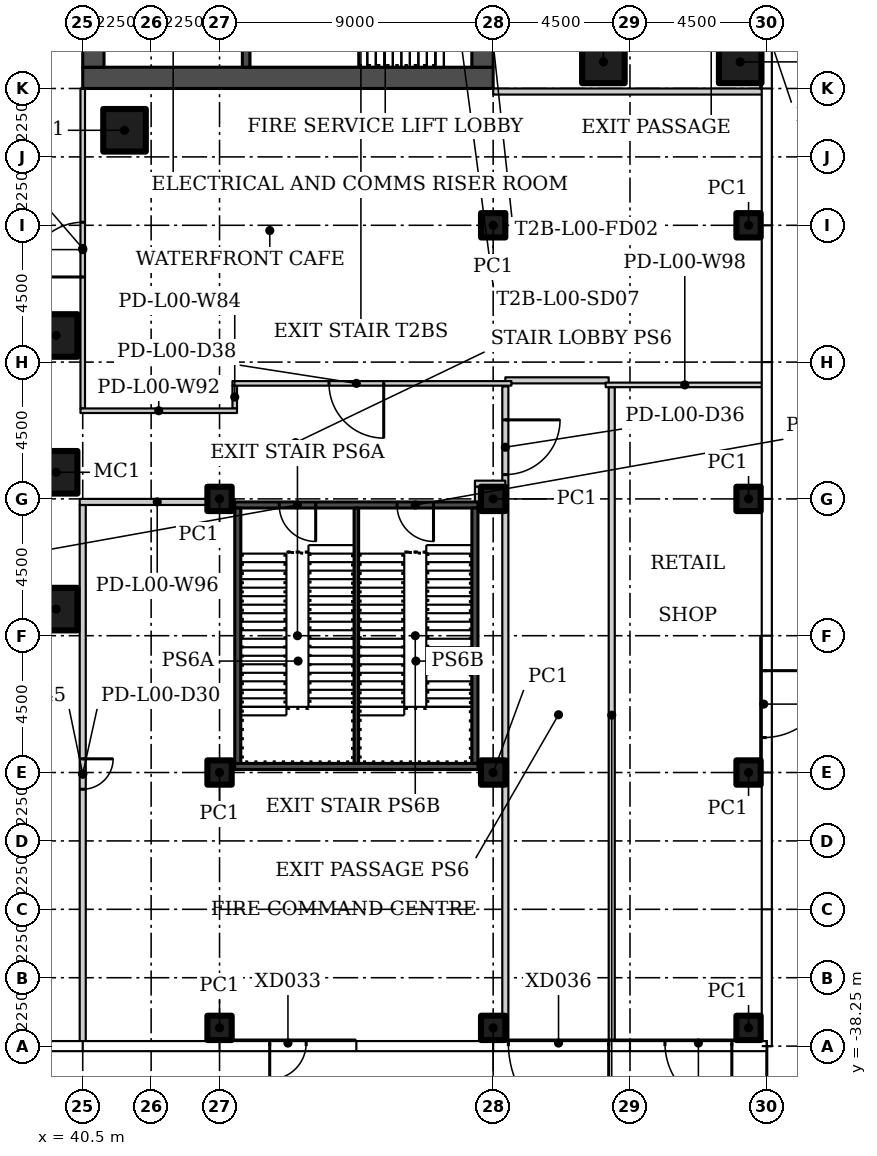
"""IFC4 building model, lengths in metres.
Left out: names, types, materials, properties, quantities, classifications, styles, units other than length and angle.
Written with IfcOpenShell. Run it as: python <this file> out.ifc"""

import sys

from ifc_helpers import new_model, si_unit, direction, frame, frame_2d, origin, origin_2d, place, context, subcontext, project, spatial, rectangle, hollow_rectangle, extrude, element, fill, save


model = new_model("IFC4")
c1 = context("Model", 3, precision=1e-05, world=origin(), true_north=direction((0.0, 1.0)))
c2 = subcontext(c1, "Body", "Model", "MODEL_VIEW")
j1 = project(units=[si_unit("LENGTHUNIT", "METRE"), si_unit("PLANEANGLEUNIT", "RADIAN")], contexts=[c1])
p1 = place(None, origin())
s1 = spatial("IfcSite", under=j1, at=p1, CompositionType="ELEMENT")
p2 = place(p1, origin())
s2 = spatial("IfcBuilding", under=s1, at=p2, CompositionType="ELEMENT")
p3 = place(p2, origin())
s3 = spatial("IfcBuildingStorey", under=s2, at=p3, CompositionType="ELEMENT", Elevation=0.0)
for number, where in (
    (1, (41.875, -8.125, 0.0)),
    (2, (39.625, -14.875, 0.0)),
    (3, (39.625, -19.375, 0.0)),
    (4, (39.625, -23.875, 0.0)),
    (5, (57.625, -5.875, 0.0)),
    (6, (62.125, -5.875, 0.0)),
):
    element("IfcColumn", number, at=place(p3, frame(where)), inside=s3, PredefinedType="COLUMN", context=c2, shape_type="SweptSolid", body=[
        extrude(hollow_rectangle(XDim=1.4, YDim=1.4, WallThickness=0.06, at=origin_2d()), origin(), (0.0, 0.0, 1.0), 6.1),
    ])
for number, where in (
    (7, (45.0, -37.65, 0.0)),
    (8, (45.0, -29.25, 0.0)),
    (9, (45.0, -20.25, 0.0)),
    (10, (54.0, -37.65, 0.0)),
    (11, (54.0, -29.25, 0.0)),
    (12, (54.0, -20.25, 0.0)),
    (13, (54.0, -11.25, 0.0)),
    (14, (62.4, -37.65, 0.0)),
    (15, (62.4, -29.25, 0.0)),
    (16, (62.4, -20.25, 0.0)),
    (17, (62.4, -11.25, 0.0)),
):
    element("IfcColumn", number, at=place(p3, frame(where)), inside=s3, PredefinedType="COLUMN", context=c2, shape_type="SweptSolid", body=[
        extrude(hollow_rectangle(XDim=0.8, YDim=0.8, WallThickness=0.03, at=origin_2d()), origin(), (0.0, 0.0, 1.0), 6.1),
    ])
p4 = place(p3, frame((54.0, -6.85, 0.0)))
e18 = element("IfcWall", 18, at=p4, inside=s3, PredefinedType="PARTITIONING", context=c2, shape_type="SweptSolid", body=[
    extrude(rectangle(XDim=8.905, YDim=0.2, at=frame_2d((4.453, 0.0))), origin(), (0.0, 0.0, 1.0), 6.1),
])
p5 = place(p3, frame((54.4, -16.55, 0.0), z_axis=(0.0, 0.0, 1.0), x_axis=(0.0, -1.0, 0.0)))
e19 = element("IfcWall", 19, at=p5, inside=s3, PredefinedType="PARTITIONING", context=c2, shape_type="SweptSolid", body=[
    extrude(rectangle(XDim=21.605, YDim=0.2, at=frame_2d((10.802, 0.0))), origin(), (0.0, 0.0, 1.0), 6.1),
])
p6 = place(p5, frame((1.1, 0.0, 0.0)))
e20 = element("IfcOpeningElement", 20, at=p6, cuts=e19, PredefinedType="OPENING", context=c2, shape_type="SweptSolid", body=[
    extrude(rectangle(XDim=1.8, YDim=2.1, at=frame_2d((0.9, 1.05))), frame((0.0, 0.11, 0.0), z_axis=(0.0, -1.0, 0.0), x_axis=(1.0, 0.0, 0.0)), (0.0, 0.0, 1.0), 0.22),
])
p7 = place(p3, frame((57.9, -38.155, 0.0), z_axis=(0.0, 0.0, 1.0), x_axis=(0.0, 1.0, 0.0)))
e21 = element("IfcWall", 21, at=p7, inside=s3, PredefinedType="PARTITIONING", context=c2, shape_type="SweptSolid", body=[
    extrude(rectangle(XDim=21.58, YDim=0.2, at=frame_2d((10.79, 0.0))), origin(), (0.0, 0.0, 1.0), 6.1),
])
p8 = place(p3, frame((57.8, -16.35, 0.0), z_axis=(0.0, 0.0, 1.0), x_axis=(-1.0, 0.0, 0.0)))
e22 = element("IfcWall", 22, at=p8, inside=s3, PredefinedType="PARTITIONING", context=c2, shape_type="SweptSolid", body=[
    extrude(rectangle(XDim=3.4, YDim=0.2, at=frame_2d((1.7, 0.0))), origin(), (0.0, 0.0, 1.0), 6.1),
])
p9 = place(p3, frame((40.5, -20.45, 0.0), z_axis=(0.0, 0.0, 1.0), x_axis=(0.0, -1.0, 0.0)))
e23 = element("IfcWall", 23, at=p9, inside=s3, PredefinedType="PARTITIONING", context=c2, shape_type="SweptSolid", body=[
    extrude(rectangle(XDim=17.705, YDim=0.2, at=frame_2d((8.853, 0.0))), origin(), (0.0, 0.0, 1.0), 6.1),
])
p10 = place(p9, frame((8.35, 0.0, 0.0)))
e24 = element("IfcOpeningElement", 24, at=p10, cuts=e23, PredefinedType="OPENING", context=c2, shape_type="SweptSolid", body=[
    extrude(rectangle(XDim=1.0, YDim=2.1, at=frame_2d((0.5, 1.05))), frame((0.0, 0.11, 0.0), z_axis=(0.0, -1.0, 0.0), x_axis=(1.0, 0.0, 0.0)), (0.0, 0.0, 1.0), 0.22),
])
p11 = place(p3, frame((40.5, -17.275, 0.0), z_axis=(0.0, 0.0, 1.0), x_axis=(0.0, 1.0, 0.0)))
e25 = element("IfcWall", 25, at=p11, inside=s3, PredefinedType="PARTITIONING", context=c2, shape_type="SweptSolid", body=[
    extrude(rectangle(XDim=10.525, YDim=0.15, at=frame_2d((5.262, 0.0))), origin(), (0.0, 0.0, 1.0), 6.1),
])
p12 = place(p11, frame((4.325, 0.0, 0.0)))
e26 = element("IfcOpeningElement", 26, at=p12, cuts=e25, PredefinedType="OPENING", context=c2, shape_type="SweptSolid", body=[
    extrude(rectangle(XDim=1.8, YDim=2.4, at=frame_2d((0.9, 1.2))), frame((0.0, 0.085, 0.0), z_axis=(0.0, -1.0, 0.0), x_axis=(1.0, 0.0, 0.0)), (0.0, 0.0, 1.0), 0.17),
])
p13 = place(p3, frame((45.5, -16.525, 0.0), z_axis=(0.0, 0.0, 1.0), x_axis=(0.0, -1.0, 0.0)))
e27 = element("IfcWall", 27, at=p13, inside=s3, PredefinedType="PARTITIONING", context=c2, shape_type="SweptSolid", body=[
    extrude(rectangle(XDim=0.75, YDim=0.15, at=frame_2d((0.375, 0.0))), origin(), (0.0, 0.0, 1.0), 6.1),
])
p14 = place(p3, frame((54.6, -16.45, 0.0), z_axis=(0.0, 0.0, 1.0), x_axis=(-1.0, 0.0, 0.0)))
e28 = element("IfcWall", 28, at=p14, inside=s3, PredefinedType="PARTITIONING", context=c2, shape_type="SweptSolid", body=[
    extrude(rectangle(XDim=9.175, YDim=0.15, at=frame_2d((4.587, 0.0))), origin(), (0.0, 0.0, 1.0), 6.1),
])
p15 = place(p14, frame((4.2, 0.0, 0.0)))
e29 = element("IfcOpeningElement", 29, at=p15, cuts=e28, PredefinedType="OPENING", context=c2, shape_type="SweptSolid", body=[
    extrude(rectangle(XDim=1.8, YDim=2.4, at=frame_2d((0.9, 1.2))), frame((0.0, 0.085, 0.0), z_axis=(0.0, -1.0, 0.0), x_axis=(1.0, 0.0, 0.0)), (0.0, 0.0, 1.0), 0.17),
])
p16 = place(p3, frame((45.575, -17.35, 0.0), z_axis=(0.0, 0.0, 1.0), x_axis=(-1.0, 0.0, 0.0)))
e30 = element("IfcWall", 30, at=p16, inside=s3, PredefinedType="PARTITIONING", context=c2, shape_type="SweptSolid", body=[
    extrude(rectangle(XDim=5.15, YDim=0.15, at=frame_2d((2.575, 0.0))), origin(), (0.0, 0.0, 1.0), 6.1),
])
p17 = place(p3, frame((54.4, -19.75, 0.0), z_axis=(0.0, 0.0, 1.0), x_axis=(-1.0, 0.0, 0.0)))
e31 = element("IfcWall", 31, at=p17, inside=s3, PredefinedType="PARTITIONING", context=c2, shape_type="SweptSolid", body=[
    extrude(rectangle(XDim=1.0, YDim=0.2, at=frame_2d((0.5, 0.0))), origin(), (0.0, 0.0, 1.0), 6.1),
])
p18 = place(p3, frame((53.5, -19.85, 0.0), z_axis=(0.0, 0.0, 1.0), x_axis=(0.0, -1.0, 0.0)))
e32 = element("IfcWall", 32, at=p18, inside=s3, PredefinedType="PARTITIONING", context=c2, shape_type="SweptSolid", body=[
    extrude(rectangle(XDim=0.5, YDim=0.2, at=frame_2d((0.25, 0.0))), origin(), (0.0, 0.0, 1.0), 6.1),
])
p19 = place(p3, frame((45.5, -20.35, 0.0), z_axis=(0.0, 0.0, 1.0), x_axis=(-1.0, 0.0, 0.0)))
e33 = element("IfcWall", 33, at=p19, inside=s3, PredefinedType="PARTITIONING", context=c2, shape_type="SweptSolid", body=[
    extrude(rectangle(XDim=5.1, YDim=0.2, at=frame_2d((2.55, 0.0))), origin(), (0.0, 0.0, 1.0), 6.1),
])
p20 = place(p3, frame((62.905, -16.5, 0.0), z_axis=(0.0, 0.0, 1.0), x_axis=(-1.0, 0.0, 0.0)))
e34 = element("IfcWall", 34, at=p20, inside=s3, PredefinedType="PARTITIONING", context=c2, shape_type="SweptSolid", body=[
    extrude(rectangle(XDim=5.205, YDim=0.15, at=frame_2d((2.603, 0.0))), origin(), (0.0, 0.0, 1.0), 6.1),
])
p21 = place(p3, frame((62.9, -2.243, 0.0), z_axis=(0.0, 0.0, 1.0), x_axis=(0.0, -1.0, 0.0)))
e35 = element("IfcWall", 35, at=p21, inside=s3, PredefinedType="SOLIDWALL", context=c2, shape_type="SweptSolid", body=[
    extrude(rectangle(XDim=4.514, YDim=0.2, at=frame_2d((2.257, 0.0))), origin(), (0.0, 0.0, 1.0), 3.0),
])
p22 = place(p21, frame((1.657, 0.0, 0.0)))
e36 = element("IfcOpeningElement", 36, at=p22, cuts=e35, PredefinedType="OPENING", context=c2, shape_type="SweptSolid", body=[
    extrude(rectangle(XDim=1.2, YDim=2.4, at=frame_2d((0.6, 1.2))), frame((0.0, 0.11, 0.0), z_axis=(0.0, -1.0, 0.0), x_axis=(1.0, 0.0, 0.0)), (0.0, 0.0, 1.0), 0.22),
])
p23 = place(p3, frame((62.9, -24.79, 0.0), z_axis=(0.0, 0.0, 1.0), x_axis=(0.0, -1.0, 0.0)))
e37 = element("IfcWall", 37, at=p23, inside=s3, PredefinedType="SOLIDWALL", context=c2, shape_type="SweptSolid", body=[
    extrude(rectangle(XDim=4.42, YDim=0.2, at=frame_2d((2.21, 0.0))), origin(), (0.0, 0.0, 1.0), 3.0),
])
p24 = place(p23, frame((1.11, 0.0, 0.0)))
e38 = element("IfcOpeningElement", 38, at=p24, cuts=e37, PredefinedType="OPENING", context=c2, shape_type="SweptSolid", body=[
    extrude(rectangle(XDim=2.2, YDim=2.4, at=frame_2d((1.1, 1.2))), frame((0.0, 0.11, 0.0), z_axis=(0.0, -1.0, 0.0), x_axis=(1.0, 0.0, 0.0)), (0.0, 0.0, 1.0), 0.22),
])
p25 = place(p3, frame((49.46, -38.15, 0.0), z_axis=(0.0, 0.0, 1.0), x_axis=(-1.0, 0.0, 0.0)))
e39 = element("IfcWall", 39, at=p25, inside=s3, PredefinedType="SOLIDWALL", context=c2, shape_type="SweptSolid", body=[
    extrude(rectangle(XDim=4.42, YDim=0.2, at=frame_2d((2.21, 0.0))), origin(), (0.0, 0.0, 1.0), 3.0),
])
p26 = place(p25, frame((1.61, 0.0, 0.0)))
e40 = element("IfcOpeningElement", 40, at=p26, cuts=e39, PredefinedType="OPENING", context=c2, shape_type="SweptSolid", body=[
    extrude(rectangle(XDim=1.2, YDim=2.4, at=frame_2d((0.6, 1.2))), frame((0.0, 0.11, 0.0), z_axis=(0.0, -1.0, 0.0), x_axis=(1.0, 0.0, 0.0)), (0.0, 0.0, 1.0), 0.22),
])
p27 = place(p3, frame((62.96, -38.15, 0.0), z_axis=(0.0, 0.0, 1.0), x_axis=(-1.0, 0.0, 0.0)))
e41 = element("IfcWall", 41, at=p27, inside=s3, PredefinedType="SOLIDWALL", context=c2, shape_type="SweptSolid", body=[
    extrude(rectangle(XDim=4.42, YDim=0.2, at=frame_2d((2.21, 0.0))), origin(), (0.0, 0.0, 1.0), 3.0),
])
p28 = place(p27, frame((1.11, 0.0, 0.0)))
e42 = element("IfcOpeningElement", 42, at=p28, cuts=e41, PredefinedType="OPENING", context=c2, shape_type="SweptSolid", body=[
    extrude(rectangle(XDim=2.2, YDim=2.4, at=frame_2d((1.1, 1.2))), frame((0.0, 0.11, 0.0), z_axis=(0.0, -1.0, 0.0), x_axis=(1.0, 0.0, 0.0)), (0.0, 0.0, 1.0), 0.22),
])
p29 = place(p3, frame((58.46, -38.15, 0.0), z_axis=(0.0, 0.0, 1.0), x_axis=(-1.0, 0.0, 0.0)))
e43 = element("IfcWall", 43, at=p29, inside=s3, PredefinedType="SOLIDWALL", context=c2, shape_type="SweptSolid", body=[
    extrude(rectangle(XDim=4.42, YDim=0.2, at=frame_2d((2.21, 0.0))), origin(), (0.0, 0.0, 1.0), 3.0),
])
p30 = place(p29, frame((0.66, 0.0, 0.0)))
e44 = element("IfcOpeningElement", 44, at=p30, cuts=e43, PredefinedType="OPENING", context=c2, shape_type="SweptSolid", body=[
    extrude(rectangle(XDim=3.3, YDim=2.4, at=frame_2d((1.65, 1.2))), frame((0.0, 0.11, 0.0), z_axis=(0.0, -1.0, 0.0), x_axis=(1.0, 0.0, 0.0)), (0.0, 0.0, 1.0), 0.22),
])
p31 = place(p3, frame((54.0, -6.4, 0.0), z_axis=(0.0, 0.0, 1.0), x_axis=(-1.0, 0.0, 0.0)))
e45 = element("IfcWall", 45, at=p31, inside=s3, PredefinedType="SHEAR", context=c2, shape_type="SweptSolid", body=[
    extrude(rectangle(XDim=13.5, YDim=0.7, at=frame_2d((6.75, 0.0))), origin(), (0.0, 0.0, 1.0), 6.1),
])
p32 = place(p3, frame((53.65, -3.5, 0.0), z_axis=(0.0, 0.0, 1.0), x_axis=(0.0, -1.0, 0.0)))
e46 = element("IfcWall", 46, at=p32, inside=s3, PredefinedType="SHEAR", context=c2, shape_type="SweptSolid", body=[
    extrude(rectangle(XDim=2.55, YDim=0.7, at=frame_2d((1.275, 0.0))), origin(), (0.0, 0.0, 1.0), 6.1),
])
p33 = place(p32, frame((0.675, 0.0, 0.0)))
e47 = element("IfcOpeningElement", 47, at=p33, cuts=e46, PredefinedType="OPENING", context=c2, shape_type="SweptSolid", body=[
    extrude(rectangle(XDim=1.2, YDim=2.4, at=frame_2d((0.6, 1.2))), frame((0.0, 0.36, 0.0), z_axis=(0.0, -1.0, 0.0), x_axis=(1.0, 0.0, 0.0)), (0.0, 0.0, 1.0), 0.72),
])
p34 = place(p3, frame((40.85, -6.05, 0.0), z_axis=(0.0, 0.0, 1.0), x_axis=(0.0, 1.0, 0.0)))
e48 = element("IfcWall", 48, at=p34, inside=s3, PredefinedType="SHEAR", context=c2, shape_type="SweptSolid", body=[
    extrude(rectangle(XDim=12.1, YDim=0.7, at=frame_2d((6.05, 0.0))), origin(), (0.0, 0.0, 1.0), 6.1),
])
p35 = place(p34, frame((0.8, 0.0, 0.0)))
e49 = element("IfcOpeningElement", 49, at=p35, cuts=e48, PredefinedType="OPENING", context=c2, shape_type="SweptSolid", body=[
    extrude(rectangle(XDim=1.2, YDim=2.1, at=frame_2d((0.6, 1.05))), frame((0.0, 0.36, 0.0), z_axis=(0.0, -1.0, 0.0), x_axis=(1.0, 0.0, 0.0)), (0.0, 0.0, 1.0), 0.72),
])
p36 = place(p34, frame((6.4, 0.0, 0.0)))
e50 = element("IfcOpeningElement", 50, at=p36, cuts=e48, PredefinedType="OPENING", context=c2, shape_type="SweptSolid", body=[
    extrude(rectangle(XDim=1.8, YDim=2.4, at=frame_2d((0.9, 1.2))), frame((0.0, 0.36, 0.0), z_axis=(0.0, -1.0, 0.0), x_axis=(1.0, 0.0, 0.0)), (0.0, 0.0, 1.0), 0.72),
])
p37 = place(p3, frame((45.875, -6.05, 0.0), z_axis=(0.0, 0.0, 1.0), x_axis=(0.0, 1.0, 0.0)))
e51 = element("IfcWall", 51, at=p37, inside=s3, PredefinedType="SHEAR", context=c2, shape_type="SweptSolid", body=[
    extrude(rectangle(XDim=2.55, YDim=0.25, at=frame_2d((1.275, 0.0))), origin(), (0.0, 0.0, 1.0), 6.1),
])
p38 = place(p3, frame((53.5, -20.45, 0.0), z_axis=(0.0, 0.0, 1.0), x_axis=(-1.0, 0.0, 0.0)))
e52 = element("IfcWall", 52, at=p38, inside=s3, PredefinedType="SHEAR", context=c2, shape_type="SweptSolid", body=[
    extrude(rectangle(XDim=8.0, YDim=0.2, at=frame_2d((4.0, 0.0))), origin(), (0.0, 0.0, 1.0), 6.1),
])
p39 = place(p38, frame((5.337, 0.0, 0.0)))
e53 = element("IfcOpeningElement", 53, at=p39, cuts=e52, PredefinedType="OPENING", context=c2, shape_type="SweptSolid", body=[
    extrude(rectangle(XDim=1.2, YDim=2.4, at=frame_2d((0.6, 1.2))), frame((0.0, 0.11, 0.0), z_axis=(0.0, -1.0, 0.0), x_axis=(1.0, 0.0, 0.0)), (0.0, 0.0, 1.0), 0.22),
])
p40 = place(p38, frame((1.462, 0.0, 0.0)))
e54 = element("IfcOpeningElement", 54, at=p40, cuts=e52, PredefinedType="OPENING", context=c2, shape_type="SweptSolid", body=[
    extrude(rectangle(XDim=1.2, YDim=2.4, at=frame_2d((0.6, 1.2))), frame((0.0, 0.11, 0.0), z_axis=(0.0, -1.0, 0.0), x_axis=(1.0, 0.0, 0.0)), (0.0, 0.0, 1.0), 0.22),
])
p41 = place(p3, frame((45.5, -29.05, 0.0)))
e55 = element("IfcWall", 55, at=p41, inside=s3, PredefinedType="SHEAR", context=c2, shape_type="SweptSolid", body=[
    extrude(rectangle(XDim=8.0, YDim=0.2, at=frame_2d((4.0, 0.0))), origin(), (0.0, 0.0, 1.0), 6.1),
])
for number, where, z_axis, x_axis in (
    (56, (45.6, -28.95, 0.0), (0.0, 0.0, 1.0), (0.0, 1.0, 0.0)),
    (57, (53.4, -28.95, 0.0), (0.0, 0.0, 1.0), (0.0, 1.0, 0.0)),
):
    element("IfcWall", number, at=place(p3, frame(where, z_axis=z_axis, x_axis=x_axis)), inside=s3, PredefinedType="SHEAR", context=c2, shape_type="SweptSolid", body=[
        extrude(rectangle(XDim=8.4, YDim=0.2, at=frame_2d((4.2, 0.0))), origin(), (0.0, 0.0, 1.0), 6.1),
    ])
p42 = place(p3, frame((49.5, -28.95, 0.0), z_axis=(0.0, 0.0, 1.0), x_axis=(0.0, 1.0, 0.0)))
e58 = element("IfcWall", 58, at=p42, inside=s3, PredefinedType="SHEAR", context=c2, shape_type="SweptSolid", body=[
    extrude(rectangle(XDim=8.4, YDim=0.15, at=frame_2d((4.2, 0.0))), origin(), (0.0, 0.0, 1.0), 6.1),
])
p43 = place(p10, origin())
e59 = element("IfcDoor", 59, at=p43, inside=s3, OperationType="SINGLE_SWING_LEFT", PredefinedType="DOOR", context=c2, shape_type="SweptSolid", body=[
    extrude(rectangle(XDim=1.0, YDim=2.1, at=frame_2d((0.5, 1.05))), frame((0.0, 0.025, 0.0), z_axis=(0.0, -1.0, 0.0), x_axis=(1.0, 0.0, 0.0)), (0.0, 0.0, 1.0), 0.05),
])
fill(e24, e59)
p44 = place(p12, origin())
e60 = element("IfcDoor", 60, at=p44, inside=s3, OperationType="DOUBLE_DOOR_SINGLE_SWING", PredefinedType="DOOR", context=c2, shape_type="SweptSolid", body=[
    extrude(rectangle(XDim=1.8, YDim=2.4, at=frame_2d((0.9, 1.2))), frame((0.0, 0.025, 0.0), z_axis=(0.0, -1.0, 0.0), x_axis=(1.0, 0.0, 0.0)), (0.0, 0.0, 1.0), 0.05),
])
fill(e26, e60)
p45 = place(p6, origin())
e61 = element("IfcDoor", 61, at=p45, inside=s3, OperationType="DOUBLE_DOOR_SINGLE_SWING", PredefinedType="DOOR", context=c2, shape_type="SweptSolid", body=[
    extrude(rectangle(XDim=1.8, YDim=2.1, at=frame_2d((0.9, 1.05))), frame((0.0, 0.025, 0.0), z_axis=(0.0, -1.0, 0.0), x_axis=(1.0, 0.0, 0.0)), (0.0, 0.0, 1.0), 0.05),
])
fill(e20, e61)
p46 = place(p15, origin())
e62 = element("IfcDoor", 62, at=p46, inside=s3, OperationType="DOUBLE_DOOR_SINGLE_SWING", PredefinedType="DOOR", context=c2, shape_type="SweptSolid", body=[
    extrude(rectangle(XDim=1.8, YDim=2.4, at=frame_2d((0.9, 1.2))), frame((0.0, 0.025, 0.0), z_axis=(0.0, -1.0, 0.0), x_axis=(1.0, 0.0, 0.0)), (0.0, 0.0, 1.0), 0.05),
])
fill(e29, e62)
p47 = place(p24, origin())
e63 = element("IfcDoor", 63, at=p47, inside=s3, OperationType="DOUBLE_DOOR_SINGLE_SWING", PredefinedType="DOOR", context=c2, shape_type="SweptSolid", body=[
    extrude(rectangle(XDim=2.2, YDim=2.4, at=frame_2d((1.1, 1.2))), frame((0.0, 0.025, 0.0), z_axis=(0.0, -1.0, 0.0), x_axis=(1.0, 0.0, 0.0)), (0.0, 0.0, 1.0), 0.05),
])
fill(e38, e63)
p48 = place(p26, origin())
e64 = element("IfcDoor", 64, at=p48, inside=s3, OperationType="SINGLE_SWING_RIGHT", PredefinedType="DOOR", context=c2, shape_type="SweptSolid", body=[
    extrude(rectangle(XDim=1.2, YDim=2.4, at=frame_2d((0.6, 1.2))), frame((0.0, 0.025, 0.0), z_axis=(0.0, -1.0, 0.0), x_axis=(1.0, 0.0, 0.0)), (0.0, 0.0, 1.0), 0.05),
])
fill(e40, e64)
p49 = place(p28, origin())
e65 = element("IfcDoor", 65, at=p49, inside=s3, OperationType="DOUBLE_DOOR_SINGLE_SWING", PredefinedType="DOOR", context=c2, shape_type="SweptSolid", body=[
    extrude(rectangle(XDim=2.2, YDim=2.4, at=frame_2d((1.1, 1.2))), frame((0.0, 0.025, 0.0), z_axis=(0.0, -1.0, 0.0), x_axis=(1.0, 0.0, 0.0)), (0.0, 0.0, 1.0), 0.05),
])
fill(e42, e65)
p50 = place(p30, origin())
e66 = element("IfcDoor", 66, at=p50, inside=s3, OperationType="DOUBLE_DOOR_SINGLE_SWING", PredefinedType="DOOR", context=c2, shape_type="SweptSolid", body=[
    extrude(rectangle(XDim=3.3, YDim=2.4, at=frame_2d((1.65, 1.2))), frame((0.0, 0.025, 0.0), z_axis=(0.0, -1.0, 0.0), x_axis=(1.0, 0.0, 0.0)), (0.0, 0.0, 1.0), 0.05),
])
fill(e44, e66)
p51 = place(p39, origin())
e67 = element("IfcDoor", 67, at=p51, inside=s3, OperationType="SINGLE_SWING_LEFT", PredefinedType="DOOR", context=c2, shape_type="SweptSolid", body=[
    extrude(rectangle(XDim=1.2, YDim=2.4, at=frame_2d((0.6, 1.2))), frame((0.0, 0.025, 0.0), z_axis=(0.0, -1.0, 0.0), x_axis=(1.0, 0.0, 0.0)), (0.0, 0.0, 1.0), 0.05),
])
fill(e53, e67)
p52 = place(p40, origin())
e68 = element("IfcDoor", 68, at=p52, inside=s3, OperationType="SINGLE_SWING_RIGHT", PredefinedType="DOOR", context=c2, shape_type="SweptSolid", body=[
    extrude(rectangle(XDim=1.2, YDim=2.4, at=frame_2d((0.6, 1.2))), frame((0.0, 0.025, 0.0), z_axis=(0.0, -1.0, 0.0), x_axis=(1.0, 0.0, 0.0)), (0.0, 0.0, 1.0), 0.05),
])
fill(e54, e68)
save(model, sys.argv[1])
